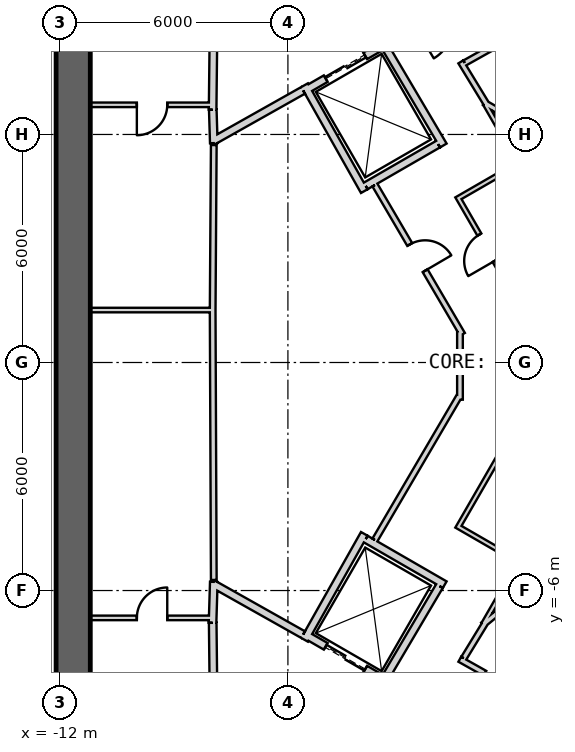
"""IFC4 building model, lengths in metres.
Left out: names, types, materials, properties, quantities, classifications, styles, units other than length and angle.
Written with IfcOpenShell. Run it as: python <this file> out.ifc"""

import sys

from ifc_helpers import new_model, si_unit, direction, frame, frame_2d, origin, place, context, subcontext, project, spatial, rectangle, extrude, element, fill, save


model = new_model("IFC4")
c1 = context("Model", 3, precision=1e-05, world=origin(), true_north=direction((0.0, 1.0)))
c2 = subcontext(c1, "Body", "Model", "MODEL_VIEW")
j1 = project(units=[si_unit("LENGTHUNIT", "METRE"), si_unit("PLANEANGLEUNIT", "RADIAN")], contexts=[c1])
p1 = place(None, origin())
s1 = spatial("IfcSite", under=j1, at=p1, CompositionType="ELEMENT")
p2 = place(p1, origin())
s2 = spatial("IfcBuilding", under=s1, at=p2, CompositionType="ELEMENT")
p3 = place(p2, frame((0.0, 0.0, 398.3)))
s3 = spatial("IfcBuildingStorey", under=s2, at=p3, CompositionType="ELEMENT", Elevation=398.3)
p4 = place(p3, frame((19.475, 2.208, 0.0), z_axis=(0.0, 0.0, 1.0), x_axis=(-0.866028369851, 0.499994862586, 0.0)))
e1 = element("IfcWall", 1, at=p4, inside=s3, PredefinedType="SHEAR", context=c2, shape_type="SweptSolid", body=[
    extrude(rectangle(XDim=31.523, YDim=0.9, at=frame_2d((15.762, 0.0))), origin(), (0.0, 0.0, 1.0), 6.5),
])
p5 = place(p4, frame((3.612, 0.0, 0.0)))
e2 = element("IfcOpeningElement", 2, at=p5, cuts=e1, PredefinedType="OPENING", context=c2, shape_type="SweptSolid", body=[
    extrude(rectangle(XDim=1.2, YDim=2.4, at=frame_2d((0.6, 1.2))), frame((0.0, 0.46, 0.0), z_axis=(0.0, -1.0, 0.0), x_axis=(1.0, 0.0, 0.0)), (0.0, 0.0, 1.0), 0.92),
])
p6 = place(p4, frame((26.712, 0.0, 0.0)))
e3 = element("IfcOpeningElement", 3, at=p6, cuts=e1, PredefinedType="OPENING", context=c2, shape_type="SweptSolid", body=[
    extrude(rectangle(XDim=1.2, YDim=2.4, at=frame_2d((0.6, 1.2))), frame((0.0, 0.46, 0.0), z_axis=(0.0, -1.0, 0.0), x_axis=(1.0, 0.0, 0.0)), (0.0, 0.0, 1.0), 0.92),
])
p7 = place(p3, frame((-11.65, 15.762, 0.0), z_axis=(0.0, 0.0, 1.0), x_axis=(0.0, -1.0, 0.0)))
e4 = element("IfcWall", 4, at=p7, inside=s3, PredefinedType="SHEAR", context=c2, shape_type="SweptSolid", body=[
    extrude(rectangle(XDim=31.523, YDim=0.9, at=frame_2d((15.762, 0.0))), origin(), (0.0, 0.0, 1.0), 6.5),
])
p8 = place(p7, frame((3.612, 0.0, 0.0)))
e5 = element("IfcOpeningElement", 5, at=p8, cuts=e4, PredefinedType="OPENING", context=c2, shape_type="SweptSolid", body=[
    extrude(rectangle(XDim=1.2, YDim=2.4, at=frame_2d((0.6, 1.2))), frame((0.0, 0.46, 0.0), z_axis=(0.0, -1.0, 0.0), x_axis=(1.0, 0.0, 0.0)), (0.0, 0.0, 1.0), 0.92),
])
p9 = place(p7, frame((26.712, 0.0, 0.0)))
e6 = element("IfcOpeningElement", 6, at=p9, cuts=e4, PredefinedType="OPENING", context=c2, shape_type="SweptSolid", body=[
    extrude(rectangle(XDim=1.2, YDim=2.4, at=frame_2d((0.6, 1.2))), frame((0.0, 0.46, 0.0), z_axis=(0.0, -1.0, 0.0), x_axis=(1.0, 0.0, 0.0)), (0.0, 0.0, 1.0), 0.92),
])
p10 = place(p3, frame((-7.825, -17.97, 0.0), z_axis=(0.0, 0.0, 1.0), x_axis=(0.866028369851, 0.499994862586, 0.0)))
e7 = element("IfcWall", 7, at=p10, inside=s3, PredefinedType="SHEAR", context=c2, shape_type="SweptSolid", body=[
    extrude(rectangle(XDim=31.523, YDim=0.9, at=frame_2d((15.762, 0.0))), origin(), (0.0, 0.0, 1.0), 6.5),
])
p11 = place(p10, frame((7.062, 0.0, 0.0)))
e8 = element("IfcOpeningElement", 8, at=p11, cuts=e7, PredefinedType="OPENING", context=c2, shape_type="SweptSolid", body=[
    extrude(rectangle(XDim=1.2, YDim=2.4, at=frame_2d((0.6, 1.2))), frame((0.0, 0.46, 0.0), z_axis=(0.0, -1.0, 0.0), x_axis=(1.0, 0.0, 0.0)), (0.0, 0.0, 1.0), 0.92),
])
p12 = place(p10, frame((9.762, 0.0, 0.0)))
e9 = element("IfcOpeningElement", 9, at=p12, cuts=e7, PredefinedType="OPENING", context=c2, shape_type="SweptSolid", body=[
    extrude(rectangle(XDim=1.2, YDim=2.4, at=frame_2d((0.6, 1.2))), frame((0.0, 0.46, 0.0), z_axis=(0.0, -1.0, 0.0), x_axis=(1.0, 0.0, 0.0)), (0.0, 0.0, 1.0), 0.92),
])
p13 = place(p10, frame((17.862, 0.0, 0.0)))
e10 = element("IfcOpeningElement", 10, at=p13, cuts=e7, PredefinedType="OPENING", context=c2, shape_type="SweptSolid", body=[
    extrude(rectangle(XDim=1.2, YDim=2.4, at=frame_2d((0.6, 1.2))), frame((0.0, 0.46, 0.0), z_axis=(0.0, -1.0, 0.0), x_axis=(1.0, 0.0, 0.0)), (0.0, 0.0, 1.0), 0.92),
])
p14 = place(p10, frame((20.562, 0.0, 0.0)))
e11 = element("IfcOpeningElement", 11, at=p14, cuts=e7, PredefinedType="OPENING", context=c2, shape_type="SweptSolid", body=[
    extrude(rectangle(XDim=1.2, YDim=2.4, at=frame_2d((0.6, 1.2))), frame((0.0, 0.46, 0.0), z_axis=(0.0, -1.0, 0.0), x_axis=(1.0, 0.0, 0.0)), (0.0, 0.0, 1.0), 0.92),
])
p15 = place(p10, frame((26.712, 0.0, 0.0)))
e12 = element("IfcOpeningElement", 12, at=p15, cuts=e7, PredefinedType="OPENING", context=c2, shape_type="SweptSolid", body=[
    extrude(rectangle(XDim=1.2, YDim=2.4, at=frame_2d((0.6, 1.2))), frame((0.0, 0.46, 0.0), z_axis=(0.0, -1.0, 0.0), x_axis=(1.0, 0.0, 0.0)), (0.0, 0.0, 1.0), 0.92),
])
p16 = place(p10, frame((3.612, 0.0, 0.0)))
e13 = element("IfcOpeningElement", 13, at=p16, cuts=e7, PredefinedType="OPENING", context=c2, shape_type="SweptSolid", body=[
    extrude(rectangle(XDim=1.2, YDim=2.4, at=frame_2d((0.6, 1.2))), frame((0.0, 0.46, 0.0), z_axis=(0.0, -1.0, 0.0), x_axis=(1.0, 0.0, 0.0)), (0.0, 0.0, 1.0), 0.92),
])
p17 = place(p3, frame((-5.524, 7.168, 0.0), z_axis=(0.0, 0.0, 1.0), x_axis=(0.866024647952, 0.500001309137, 0.0)))
e14 = element("IfcWall", 14, at=p17, inside=s3, PredefinedType="PLUMBINGWALL", context=c2, shape_type="SweptSolid", body=[
    extrude(rectangle(XDim=2.4, YDim=0.2, at=frame_2d((1.2, 0.0))), origin(), (0.0, 0.0, 1.0), 6.2),
])
p18 = place(p17, frame((0.6, 0.0, 0.0)))
e15 = element("IfcOpeningElement", 15, at=p18, cuts=e14, PredefinedType="OPENING", context=c2, shape_type="SweptSolid", body=[
    extrude(rectangle(XDim=1.2, YDim=2.4, at=frame_2d((0.6, 1.2))), frame((0.0, 0.11, 0.0), z_axis=(0.0, -1.0, 0.0), x_axis=(1.0, 0.0, 0.0)), (0.0, 0.0, 1.0), 0.22),
])
p19 = place(p3, frame((-2.047, 5.746, 0.0), z_axis=(0.0, 0.0, 1.0), x_axis=(-0.86605622881, -0.499946605688, 0.0)))
e16 = element("IfcWall", 16, at=p19, inside=s3, PredefinedType="PLUMBINGWALL", context=c2, shape_type="SweptSolid", body=[
    extrude(rectangle(XDim=2.2, YDim=0.2, at=frame_2d((1.1, 0.0))), origin(), (0.0, 0.0, 1.0), 6.2),
])
p20 = place(p3, frame((-3.99, 4.509, 0.0), z_axis=(0.0, 0.0, 1.0), x_axis=(-0.491358283181, 0.870957540612, 0.0)))
e17 = element("IfcWall", 17, at=p20, inside=s3, PredefinedType="PLUMBINGWALL", context=c2, shape_type="SweptSolid", body=[
    extrude(rectangle(XDim=3.2, YDim=0.2, at=frame_2d((1.6, 0.0))), origin(), (0.0, 0.0, 1.0), 6.2),
])
p21 = place(p3, frame((-3.538, 8.465, 0.0), z_axis=(0.0, 0.0, 1.0), x_axis=(0.508616218331, -0.860993346345, 0.0)))
e18 = element("IfcWall", 18, at=p21, inside=s3, PredefinedType="PLUMBINGWALL", context=c2, shape_type="SweptSolid", body=[
    extrude(rectangle(XDim=3.2, YDim=0.2, at=frame_2d((1.6, 0.0))), origin(), (0.0, 0.0, 1.0), 6.2),
])
p22 = place(p3, frame((-3.446, -8.368, 0.0), z_axis=(0.0, 0.0, 1.0), x_axis=(-0.866024647952, 0.500001309137, 0.0)))
e19 = element("IfcWall", 19, at=p22, inside=s3, PredefinedType="PLUMBINGWALL", context=c2, shape_type="SweptSolid", body=[
    extrude(rectangle(XDim=2.4, YDim=0.2, at=frame_2d((1.2, 0.0))), origin(), (0.0, 0.0, 1.0), 6.2),
])
p23 = place(p22, frame((0.6, 0.0, 0.0)))
e20 = element("IfcOpeningElement", 20, at=p23, cuts=e19, PredefinedType="OPENING", context=c2, shape_type="SweptSolid", body=[
    extrude(rectangle(XDim=1.2, YDim=2.4, at=frame_2d((0.6, 1.2))), frame((0.0, 0.11, 0.0), z_axis=(0.0, -1.0, 0.0), x_axis=(1.0, 0.0, 0.0)), (0.0, 0.0, 1.0), 0.22),
])
p24 = place(p3, frame((-5.562, -7.296, 0.0), z_axis=(0.0, 0.0, 1.0), x_axis=(0.491358283181, 0.870957540612, 0.0)))
e21 = element("IfcWall", 21, at=p24, inside=s3, PredefinedType="PLUMBINGWALL", context=c2, shape_type="SweptSolid", body=[
    extrude(rectangle(XDim=3.2, YDim=0.2, at=frame_2d((1.6, 0.0))), origin(), (0.0, 0.0, 1.0), 6.2),
])
p25 = place(p3, frame((-3.953, -4.646, 0.0), z_axis=(0.0, 0.0, 1.0), x_axis=(0.866024647952, -0.500001309137, 0.0)))
e22 = element("IfcWall", 22, at=p25, inside=s3, PredefinedType="PLUMBINGWALL", context=c2, shape_type="SweptSolid", body=[
    extrude(rectangle(XDim=2.4, YDim=0.2, at=frame_2d((1.2, 0.0))), origin(), (0.0, 0.0, 1.0), 6.2),
])
p26 = place(p3, frame((-2.012, -5.882, 0.0), z_axis=(0.0, 0.0, 1.0), x_axis=(-0.508619639323, -0.860991325447, 0.0)))
e23 = element("IfcWall", 23, at=p26, inside=s3, PredefinedType="PLUMBINGWALL", context=c2, shape_type="SweptSolid", body=[
    extrude(rectangle(XDim=3.0, YDim=0.2, at=frame_2d((1.5, 0.0))), origin(), (0.0, 0.0, 1.0), 6.2),
])
p27 = place(p3, frame((-7.95, 6.78, 0.0), z_axis=(0.0, 0.0, 1.0), x_axis=(-1.0, 0.0, 0.0)))
e24 = element("IfcWall", 24, at=p27, inside=s3, PredefinedType="PARTITIONING", context=c2, shape_type="SweptSolid", body=[
    extrude(rectangle(XDim=3.25, YDim=0.12, at=frame_2d((1.625, 0.0))), origin(), (0.0, 0.0, 1.0), 6.2),
])
p28 = place(p27, frame((1.225, 0.0, 0.0)))
e25 = element("IfcOpeningElement", 25, at=p28, cuts=e24, PredefinedType="OPENING", context=c2, shape_type="SweptSolid", body=[
    extrude(rectangle(XDim=0.8, YDim=2.1, at=frame_2d((0.4, 1.05))), frame((0.0, 0.07, 0.0), z_axis=(0.0, -1.0, 0.0), x_axis=(1.0, 0.0, 0.0)), (0.0, 0.0, 1.0), 0.14),
])
p29 = place(p3, frame((-7.981, 6.65, 0.0), z_axis=(0.0, 0.0, 1.0), x_axis=(0.011120469654, 0.999938165666, 0.0)))
e26 = element("IfcWall", 26, at=p29, inside=s3, PredefinedType="PARTITIONING", context=c2, shape_type="SweptSolid", body=[
    extrude(rectangle(XDim=2.7, YDim=0.2, at=frame_2d((1.35, 0.0))), origin(), (0.0, 0.0, 1.0), 6.2),
])
p30 = place(p3, frame((-7.95, 1.38, 0.0), z_axis=(0.0, 0.0, 1.0), x_axis=(-1.0, 0.0, 0.0)))
e27 = element("IfcWall", 27, at=p30, inside=s3, PredefinedType="PARTITIONING", context=c2, shape_type="SweptSolid", body=[
    extrude(rectangle(XDim=3.25, YDim=0.12, at=frame_2d((1.625, 0.0))), origin(), (0.0, 0.0, 1.0), 6.2),
])
p31 = place(p3, frame((-7.95, 5.772, 0.0), z_axis=(0.0, 0.0, 1.0), x_axis=(-0.030861509705, 0.999523670164, 0.0)))
e28 = element("IfcWall", 28, at=p31, inside=s3, PredefinedType="PARTITIONING", context=c2, shape_type="SweptSolid", body=[
    extrude(rectangle(XDim=0.878, YDim=0.2, at=frame_2d((0.439, 0.0))), origin(), (0.0, 0.0, 1.0), 6.2),
])
p32 = place(p3, frame((-7.951, 5.722, 0.0), z_axis=(0.0, 0.0, 1.0), x_axis=(-0.006701139535, -0.999977547112, 0.0)))
e29 = element("IfcWall", 29, at=p32, inside=s3, PredefinedType="PLUMBINGWALL", context=c2, shape_type="SweptSolid", body=[
    extrude(rectangle(XDim=4.372, YDim=0.15, at=frame_2d((2.186, 0.0))), origin(), (0.0, 0.0, 1.0), 6.2),
])
p33 = place(p3, frame((-11.2, -6.72, 0.0), z_axis=(0.0, 0.0, 1.0), x_axis=(1.0, 0.0, 0.0)))
e30 = element("IfcWall", 30, at=p33, inside=s3, PredefinedType="PARTITIONING", context=c2, shape_type="SweptSolid", body=[
    extrude(rectangle(XDim=3.25, YDim=0.12, at=frame_2d((1.625, 0.0))), origin(), (0.0, 0.0, 1.0), 6.2),
])
p34 = place(p33, frame((1.225, 0.0, 0.0)))
e31 = element("IfcOpeningElement", 31, at=p34, cuts=e30, PredefinedType="OPENING", context=c2, shape_type="SweptSolid", body=[
    extrude(rectangle(XDim=0.8, YDim=2.1, at=frame_2d((0.4, 1.05))), frame((0.0, 0.07, 0.0), z_axis=(0.0, -1.0, 0.0), x_axis=(1.0, 0.0, 0.0)), (0.0, 0.0, 1.0), 0.14),
])
p35 = place(p3, frame((-7.983, -6.85, 0.0), z_axis=(0.0, 0.0, 1.0), x_axis=(0.030803413295, 0.999525462272, 0.0)))
e32 = element("IfcWall", 32, at=p35, inside=s3, PredefinedType="PARTITIONING", context=c2, shape_type="SweptSolid", body=[
    extrude(rectangle(XDim=1.078, YDim=0.2, at=frame_2d((0.539, 0.0))), origin(), (0.0, 0.0, 1.0), 6.2),
])
p36 = place(p3, frame((-7.98, 1.35, 0.0), z_axis=(0.0, 0.0, 1.0), x_axis=(0.004177130679, -0.999991275752, 0.0)))
e33 = element("IfcWall", 33, at=p36, inside=s3, PredefinedType="PLUMBINGWALL", context=c2, shape_type="SweptSolid", body=[
    extrude(rectangle(XDim=7.072, YDim=0.15, at=frame_2d((3.536, 0.0))), origin(), (0.0, 0.0, 1.0), 6.2),
])
p37 = place(p3, frame((-7.949, -9.55, 0.0), z_axis=(0.0, 0.0, 1.0), x_axis=(-0.011121475088, 0.999938154483, 0.0)))
e34 = element("IfcWall", 34, at=p37, inside=s3, PredefinedType="PARTITIONING", context=c2, shape_type="SweptSolid", body=[
    extrude(rectangle(XDim=2.7, YDim=0.2, at=frame_2d((1.35, 0.0))), origin(), (0.0, 0.0, 1.0), 6.2),
])
p38 = place(p3, frame((-5.6, 7.16, 0.0), z_axis=(0.0, 0.0, 1.0), x_axis=(-0.871345799774, -0.490669437825, 0.0)))
e35 = element("IfcWall", 35, at=p38, inside=s3, PredefinedType="PARTITIONING", context=c2, shape_type="SweptSolid", body=[
    extrude(rectangle(XDim=2.726, YDim=0.2, at=frame_2d((1.363, 0.0))), origin(), (0.0, 0.0, 1.0), 6.2),
])
p39 = place(p3, frame((-7.976, -5.823, 0.0), z_axis=(0.0, 0.0, 1.0), x_axis=(0.871329070694, -0.490699144653, 0.0)))
e36 = element("IfcWall", 36, at=p39, inside=s3, PredefinedType="PARTITIONING", context=c2, shape_type="SweptSolid", body=[
    extrude(rectangle(XDim=2.726, YDim=0.2, at=frame_2d((1.363, 0.0))), origin(), (0.0, 0.0, 1.0), 6.2),
])
p40 = place(p3, frame((-1.407, 0.74, 0.0), z_axis=(0.0, 0.0, 1.0), x_axis=(-0.505642484845, 0.862743112125, 0.0)))
e37 = element("IfcWall", 37, at=p40, inside=s3, PredefinedType="PLUMBINGWALL", context=c2, shape_type="SweptSolid", body=[
    extrude(rectangle(XDim=4.556, YDim=0.15, at=frame_2d((2.278, 0.0))), origin(), (0.0, 0.0, 1.0), 6.2),
])
p41 = place(p40, frame((1.942, 0.0, 0.0)))
e38 = element("IfcOpeningElement", 38, at=p41, cuts=e37, PredefinedType="OPENING", context=c2, shape_type="SweptSolid", body=[
    extrude(rectangle(XDim=0.8, YDim=2.1, at=frame_2d((0.4, 1.05))), frame((0.0, 0.085, 0.0), z_axis=(0.0, -1.0, 0.0), x_axis=(1.0, 0.0, 0.0)), (0.0, 0.0, 1.0), 0.17),
])
p42 = place(p3, frame((-1.472, -0.978, 0.0), z_axis=(0.0, 0.0, 1.0), x_axis=(0.0, 1.0, 0.0)))
e39 = element("IfcWall", 39, at=p42, inside=s3, PredefinedType="PLUMBINGWALL", context=c2, shape_type="SweptSolid", body=[
    extrude(rectangle(XDim=1.804, YDim=0.15, at=frame_2d((0.902, 0.0))), origin(), (0.0, 0.0, 1.0), 6.2),
])
p43 = place(p3, frame((-3.711, -4.67, 0.0), z_axis=(0.0, 0.0, 1.0), x_axis=(0.505648368764, 0.86273966361, 0.0)))
e40 = element("IfcWall", 40, at=p43, inside=s3, PredefinedType="PLUMBINGWALL", context=c2, shape_type="SweptSolid", body=[
    extrude(rectangle(XDim=4.404, YDim=0.15, at=frame_2d((2.202, 0.0))), origin(), (0.0, 0.0, 1.0), 6.2),
])
p44 = place(p3, frame((6.046, -1.2, 0.0), z_axis=(0.0, 0.0, 1.0), x_axis=(-0.771489624803, -0.636241902755, 0.0)))
e41 = element("IfcWall", 41, at=p44, inside=s3, PredefinedType="PLUMBINGWALL", context=c2, shape_type="SweptSolid", body=[
    extrude(rectangle(XDim=8.961, YDim=0.15, at=frame_2d((4.48, 0.0))), origin(), (0.0, 0.0, 1.0), 6.2),
])
p45 = place(p3, frame((-1.477, -7.808, 0.0), z_axis=(0.0, 0.0, 1.0), x_axis=(0.871822901869, -0.48982122022, 0.0)))
e42 = element("IfcWall", 42, at=p45, inside=s3, PredefinedType="PLUMBINGWALL", context=c2, shape_type="SweptSolid", body=[
    extrude(rectangle(XDim=2.24, YDim=0.15, at=frame_2d((1.12, 0.0))), origin(), (0.0, 0.0, 1.0), 6.2),
])
p46 = place(p45, frame((0.757, 0.0, 0.0)))
e43 = element("IfcOpeningElement", 43, at=p46, cuts=e42, PredefinedType="OPENING", context=c2, shape_type="SweptSolid", body=[
    extrude(rectangle(XDim=0.8, YDim=2.1, at=frame_2d((0.4, 1.05))), frame((0.0, 0.085, 0.0), z_axis=(0.0, -1.0, 0.0), x_axis=(1.0, 0.0, 0.0)), (0.0, 0.0, 1.0), 0.17),
])
p47 = place(p3, frame((-0.787, -6.821, 0.0), z_axis=(0.0, 0.0, 1.0), x_axis=(-0.520993333897, -0.853560745369, 0.0)))
e44 = element("IfcWall", 44, at=p47, inside=s3, PredefinedType="PLUMBINGWALL", context=c2, shape_type="SweptSolid", body=[
    extrude(rectangle(XDim=1.125, YDim=0.15, at=frame_2d((0.562, 0.0))), origin(), (0.0, 0.0, 1.0), 6.2),
])
p48 = place(p3, frame((0.118, -5.195, 0.0), z_axis=(0.0, 0.0, 1.0), x_axis=(-0.499969367985, -0.866043088465, 0.0)))
e45 = element("IfcWall", 45, at=p48, inside=s3, PredefinedType="PARTITIONING", context=c2, shape_type="SweptSolid", body=[
    extrude(rectangle(XDim=1.94, YDim=0.12, at=frame_2d((0.97, 0.0))), origin(), (0.0, 0.0, 1.0), 6.2),
])
p49 = place(p3, frame((-1.566, -4.292, 0.0), z_axis=(0.0, 0.0, 1.0), x_axis=(0.866091100096, -0.499886193382, 0.0)))
e46 = element("IfcWall", 46, at=p49, inside=s3, PredefinedType="PARTITIONING", context=c2, shape_type="SweptSolid", body=[
    extrude(rectangle(XDim=1.85, YDim=0.12, at=frame_2d((0.925, 0.0))), origin(), (0.0, 0.0, 1.0), 6.2),
])
p50 = place(p3, frame((0.052, -1.61, 0.0), z_axis=(0.0, 0.0, 1.0), x_axis=(-0.500011413361, -0.866018814177, 0.0)))
e47 = element("IfcWall", 47, at=p50, inside=s3, PredefinedType="PARTITIONING", context=c2, shape_type="SweptSolid", body=[
    extrude(rectangle(XDim=3.072, YDim=0.12, at=frame_2d((1.536, 0.0))), origin(), (0.0, 0.0, 1.0), 6.2),
])
p51 = place(p3, frame((-0.827, 6.832, 0.0), z_axis=(0.0, 0.0, 1.0), x_axis=(0.866020293397, -0.500008851346, 0.0)))
e48 = element("IfcWall", 48, at=p51, inside=s3, PredefinedType="PLUMBINGWALL", context=c2, shape_type="SweptSolid", body=[
    extrude(rectangle(XDim=8.264, YDim=0.15, at=frame_2d((4.132, 0.0))), origin(), (0.0, 0.0, 1.0), 6.2),
])
p52 = place(p3, frame((-1.451, 7.909, 0.0), z_axis=(0.0, 0.0, 1.0), x_axis=(0.520332410011, -0.853963806664, 0.0)))
e49 = element("IfcWall", 49, at=p52, inside=s3, PredefinedType="PLUMBINGWALL", context=c2, shape_type="SweptSolid", body=[
    extrude(rectangle(XDim=1.326, YDim=0.15, at=frame_2d((0.663, 0.0))), origin(), (0.0, 0.0, 1.0), 6.2),
])
p53 = place(p3, frame((0.399, 8.863, 0.0), z_axis=(0.0, 0.0, 1.0), x_axis=(-0.871829419551, -0.489809619348, 0.0)))
e50 = element("IfcWall", 50, at=p53, inside=s3, PredefinedType="PLUMBINGWALL", context=c2, shape_type="SweptSolid", body=[
    extrude(rectangle(XDim=2.002, YDim=0.15, at=frame_2d((1.001, 0.0))), origin(), (0.0, 0.0, 1.0), 6.2),
])
p54 = place(p3, frame((-1.544, 4.374, 0.0), z_axis=(0.0, 0.0, 1.0), x_axis=(0.500023124857, -0.86601205223, 0.0)))
e51 = element("IfcWall", 51, at=p54, inside=s3, PredefinedType="PARTITIONING", context=c2, shape_type="SweptSolid", body=[
    extrude(rectangle(XDim=3.069, YDim=0.12, at=frame_2d((1.535, 0.0))), origin(), (0.0, 0.0, 1.0), 6.2),
])
p55 = place(p54, frame((1.165, 0.0, 0.0)))
e52 = element("IfcOpeningElement", 52, at=p55, cuts=e51, PredefinedType="OPENING", context=c2, shape_type="SweptSolid", body=[
    extrude(rectangle(XDim=0.8, YDim=2.1, at=frame_2d((0.4, 1.05))), frame((0.0, 0.07, 0.0), z_axis=(0.0, -1.0, 0.0), x_axis=(1.0, 0.0, 0.0)), (0.0, 0.0, 1.0), 0.14),
])
p56 = place(p3, frame((0.14, 5.277, 0.0), z_axis=(0.0, 0.0, 1.0), x_axis=(-0.866000971088, -0.500042316284, 0.0)))
e53 = element("IfcWall", 53, at=p56, inside=s3, PredefinedType="PARTITIONING", context=c2, shape_type="SweptSolid", body=[
    extrude(rectangle(XDim=1.85, YDim=0.12, at=frame_2d((0.925, 0.0))), origin(), (0.0, 0.0, 1.0), 6.2),
])
p57 = place(p3, frame((-0.812, 6.806, 0.0), z_axis=(0.0, 0.0, 1.0), x_axis=(0.500046227757, -0.865998712531, 0.0)))
e54 = element("IfcWall", 54, at=p57, inside=s3, PredefinedType="PARTITIONING", context=c2, shape_type="SweptSolid", body=[
    extrude(rectangle(XDim=1.74, YDim=0.12, at=frame_2d((0.87, 0.0))), origin(), (0.0, 0.0, 1.0), 6.2),
])
p58 = place(p18, origin())
e55 = element("IfcDoor", 55, at=p58, inside=s3, OperationType="SLIDING_TO_LEFT", PredefinedType="USERDEFINED", context=c2, shape_type="SweptSolid", body=[
    extrude(rectangle(XDim=1.2, YDim=2.4, at=frame_2d((0.6, 1.2))), frame((0.0, 0.025, 0.0), z_axis=(0.0, -1.0, 0.0), x_axis=(1.0, 0.0, 0.0)), (0.0, 0.0, 1.0), 0.05),
])
fill(e15, e55)
p59 = place(p23, origin())
e56 = element("IfcDoor", 56, at=p59, inside=s3, OperationType="SLIDING_TO_LEFT", PredefinedType="USERDEFINED", context=c2, shape_type="SweptSolid", body=[
    extrude(rectangle(XDim=1.2, YDim=2.4, at=frame_2d((0.6, 1.2))), frame((0.0, 0.025, 0.0), z_axis=(0.0, -1.0, 0.0), x_axis=(1.0, 0.0, 0.0)), (0.0, 0.0, 1.0), 0.05),
])
fill(e20, e56)
p60 = place(p41, origin())
e57 = element("IfcDoor", 57, at=p60, inside=s3, OperationType="SINGLE_SWING_LEFT", PredefinedType="USERDEFINED", context=c2, shape_type="SweptSolid", body=[
    extrude(rectangle(XDim=0.8, YDim=2.1, at=frame_2d((0.4, 1.05))), frame((0.0, 0.025, 0.0), z_axis=(0.0, -1.0, 0.0), x_axis=(1.0, 0.0, 0.0)), (0.0, 0.0, 1.0), 0.05),
])
fill(e38, e57)
p61 = place(p46, origin())
e58 = element("IfcDoor", 58, at=p61, inside=s3, OperationType="SINGLE_SWING_RIGHT", PredefinedType="USERDEFINED", context=c2, shape_type="SweptSolid", body=[
    extrude(rectangle(XDim=0.8, YDim=2.1, at=frame_2d((0.4, 1.05))), frame((0.0, 0.025, 0.0), z_axis=(0.0, -1.0, 0.0), x_axis=(1.0, 0.0, 0.0)), (0.0, 0.0, 1.0), 0.05),
])
fill(e43, e58)
p62 = place(p55, origin())
e59 = element("IfcDoor", 59, at=p62, inside=s3, OperationType="SINGLE_SWING_RIGHT", PredefinedType="USERDEFINED", context=c2, shape_type="SweptSolid", body=[
    extrude(rectangle(XDim=0.8, YDim=2.1, at=frame_2d((0.4, 1.05))), frame((0.0, 0.025, 0.0), z_axis=(0.0, -1.0, 0.0), x_axis=(1.0, 0.0, 0.0)), (0.0, 0.0, 1.0), 0.05),
])
fill(e52, e59)
p63 = place(p28, origin())
e60 = element("IfcDoor", 60, at=p63, inside=s3, OperationType="SINGLE_SWING_RIGHT", PredefinedType="USERDEFINED", context=c2, shape_type="SweptSolid", body=[
    extrude(rectangle(XDim=0.8, YDim=2.1, at=frame_2d((0.4, 1.05))), frame((0.0, 0.025, 0.0), z_axis=(0.0, -1.0, 0.0), x_axis=(1.0, 0.0, 0.0)), (0.0, 0.0, 1.0), 0.05),
])
fill(e25, e60)
p64 = place(p34, origin())
e61 = element("IfcDoor", 61, at=p64, inside=s3, OperationType="SINGLE_SWING_RIGHT", PredefinedType="USERDEFINED", context=c2, shape_type="SweptSolid", body=[
    extrude(rectangle(XDim=0.8, YDim=2.1, at=frame_2d((0.4, 1.05))), frame((0.0, 0.025, 0.0), z_axis=(0.0, -1.0, 0.0), x_axis=(1.0, 0.0, 0.0)), (0.0, 0.0, 1.0), 0.05),
])
fill(e31, e61)
save(model, sys.argv[1])
